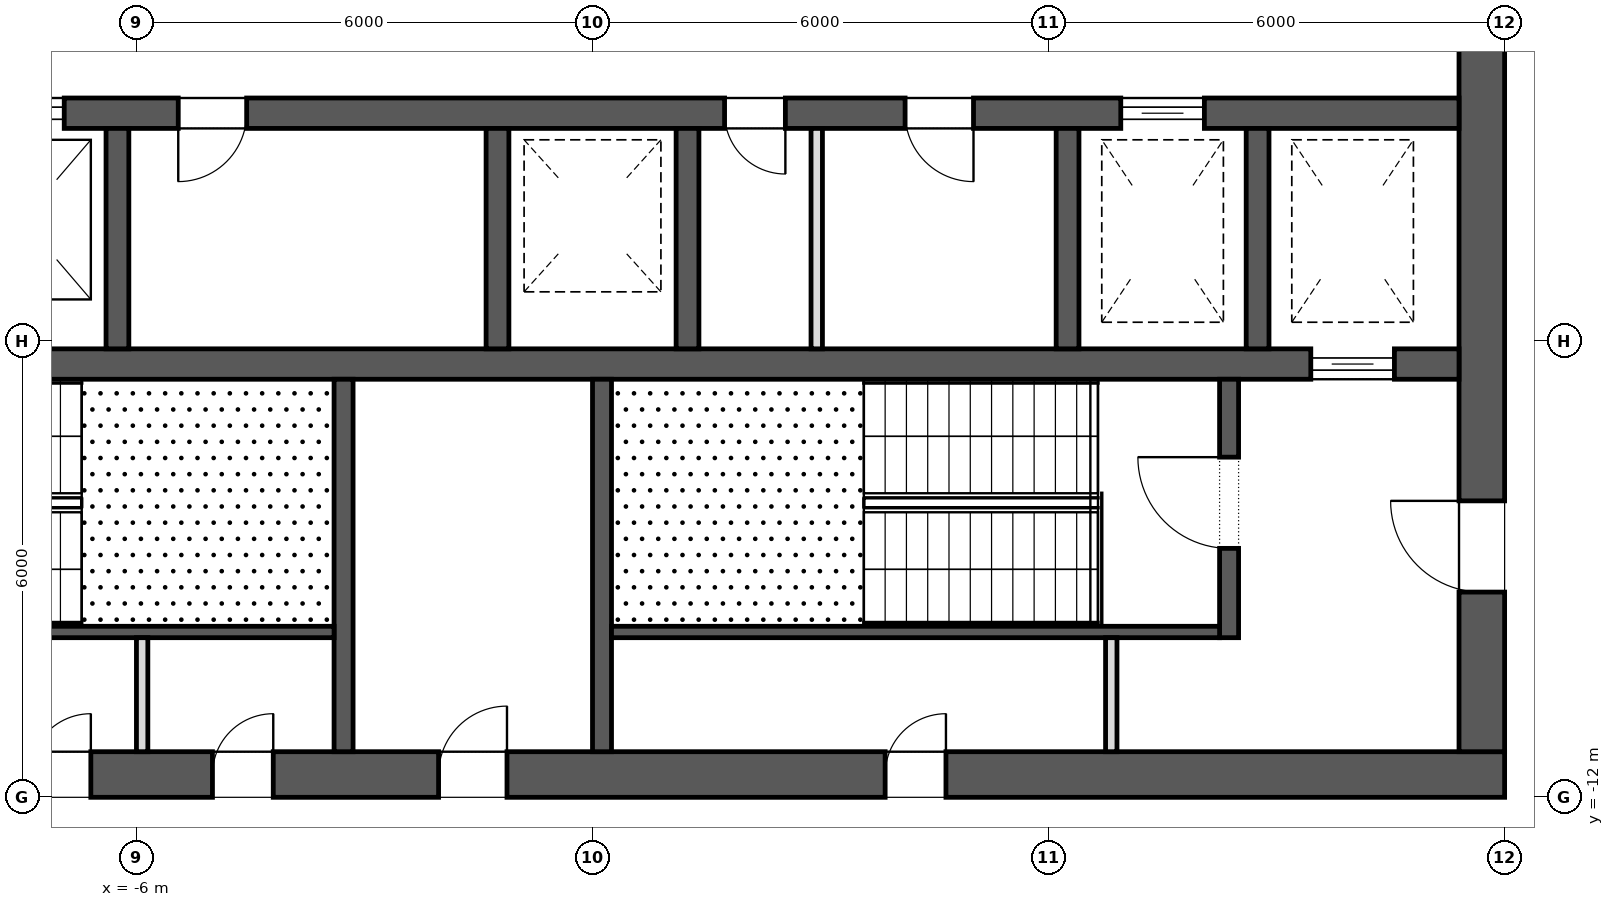
"""IFC4 building model, lengths in metres.
Left out: names, types, materials, properties, quantities, classifications, styles, units other than length and angle.
Written with IfcOpenShell. Run it as: python <this file> out.ifc"""

import sys

from ifc_helpers import new_model, si_unit, direction, frame, frame_2d, origin, place, context, subcontext, project, spatial, rectangle, extrude, element, fill, save


model = new_model("IFC4")
c1 = context("Model", 3, precision=1e-05, world=origin(), true_north=direction((0.0, 1.0)))
c2 = subcontext(c1, "Body", "Model", "MODEL_VIEW")
j1 = project(units=[si_unit("LENGTHUNIT", "METRE"), si_unit("PLANEANGLEUNIT", "RADIAN")], contexts=[c1])
p1 = place(None, origin())
s1 = spatial("IfcSite", under=j1, at=p1, CompositionType="ELEMENT")
p2 = place(p1, origin())
s2 = spatial("IfcBuilding", under=s1, at=p2, CompositionType="ELEMENT")
p3 = place(p2, frame((0.0, 0.0, 292.3)))
s3 = spatial("IfcBuildingStorey", under=s2, at=p3, CompositionType="ELEMENT", Elevation=292.3)
p4 = place(p3, frame((-12.0, -11.7, 0.0), z_axis=(0.0, 0.0, 1.0), x_axis=(1.0, 0.0, 0.0)))
e1 = element("IfcWall", 1, at=p4, inside=s3, PredefinedType="SHEAR", context=c2, shape_type="SweptSolid", body=[
    extrude(rectangle(XDim=24.0, YDim=0.6, at=frame_2d((12.0, 0.0))), origin(), (0.0, 0.0, 1.0), 4.0),
])
p5 = place(p4, frame((9.975, 0.0, 0.0)))
e2 = element("IfcOpeningElement", 2, at=p5, cuts=e1, PredefinedType="OPENING", context=c2, shape_type="SweptSolid", body=[
    extrude(rectangle(XDim=0.9, YDim=2.1, at=frame_2d((0.45, 1.05))), frame((0.0, 0.312, 0.0), z_axis=(0.0, -1.0, 0.0), x_axis=(1.0, 0.0, 0.0)), (0.0, 0.0, 1.0), 0.624),
])
p6 = place(p4, frame((4.6, 0.0, 0.0)))
e3 = element("IfcOpeningElement", 3, at=p6, cuts=e1, PredefinedType="OPENING", context=c2, shape_type="SweptSolid", body=[
    extrude(rectangle(XDim=0.8, YDim=2.1, at=frame_2d((0.4, 1.05))), frame((0.0, 0.312, 0.0), z_axis=(0.0, -1.0, 0.0), x_axis=(1.0, 0.0, 0.0)), (0.0, 0.0, 1.0), 0.624),
])
p7 = place(p4, frame((7.0, 0.0, 0.0)))
e4 = element("IfcOpeningElement", 4, at=p7, cuts=e1, PredefinedType="OPENING", context=c2, shape_type="SweptSolid", body=[
    extrude(rectangle(XDim=0.8, YDim=2.1, at=frame_2d((0.4, 1.05))), frame((0.0, 0.312, 0.0), z_axis=(0.0, -1.0, 0.0), x_axis=(1.0, 0.0, 0.0)), (0.0, 0.0, 1.0), 0.624),
])
p8 = place(p4, frame((15.85, 0.0, 0.0)))
e5 = element("IfcOpeningElement", 5, at=p8, cuts=e1, PredefinedType="OPENING", context=c2, shape_type="SweptSolid", body=[
    extrude(rectangle(XDim=0.8, YDim=2.1, at=frame_2d((0.4, 1.05))), frame((0.0, 0.312, 0.0), z_axis=(0.0, -1.0, 0.0), x_axis=(1.0, 0.0, 0.0)), (0.0, 0.0, 1.0), 0.624),
])
p9 = place(p3, frame((11.7, -11.4, 0.0), z_axis=(0.0, 0.0, 1.0), x_axis=(0.0, 1.0, 0.0)))
e6 = element("IfcWall", 6, at=p9, inside=s3, PredefinedType="SHEAR", context=c2, shape_type="SweptSolid", body=[
    extrude(rectangle(XDim=22.8, YDim=0.6, at=frame_2d((11.4, 0.0))), origin(), (0.0, 0.0, 1.0), 4.0),
])
p10 = place(p9, frame((10.2, 0.0, 0.0)))
e7 = element("IfcOpeningElement", 7, at=p10, cuts=e6, PredefinedType="OPENING", context=c2, shape_type="SweptSolid", body=[
    extrude(rectangle(XDim=2.4, YDim=2.1, at=frame_2d((1.2, 1.05))), frame((0.0, 0.312, 0.0), z_axis=(0.0, -1.0, 0.0), x_axis=(1.0, 0.0, 0.0)), (0.0, 0.0, 1.0), 0.624),
])
p11 = place(p9, frame((19.5, 0.0, 0.0)))
e8 = element("IfcOpeningElement", 8, at=p11, cuts=e6, PredefinedType="OPENING", context=c2, shape_type="SweptSolid", body=[
    extrude(rectangle(XDim=1.2, YDim=2.1, at=frame_2d((0.6, 1.05))), frame((0.0, 0.312, 0.0), z_axis=(0.0, -1.0, 0.0), x_axis=(1.0, 0.0, 0.0)), (0.0, 0.0, 1.0), 0.624),
])
p12 = place(p9, frame((2.1, 0.0, 0.0)))
e9 = element("IfcOpeningElement", 9, at=p12, cuts=e6, PredefinedType="OPENING", context=c2, shape_type="SweptSolid", body=[
    extrude(rectangle(XDim=1.2, YDim=2.1, at=frame_2d((0.6, 1.05))), frame((0.0, 0.312, 0.0), z_axis=(0.0, -1.0, 0.0), x_axis=(1.0, 0.0, 0.0)), (0.0, 0.0, 1.0), 0.624),
])
p13 = place(p3, frame((-11.4, -3.0, 0.0), z_axis=(0.0, 0.0, 1.0), x_axis=(1.0, 0.0, 0.0)))
e10 = element("IfcWall", 10, at=p13, inside=s3, PredefinedType="SHEAR", context=c2, shape_type="SweptSolid", body=[
    extrude(rectangle(XDim=22.8, YDim=0.4, at=frame_2d((11.4, 0.0))), origin(), (0.0, 0.0, 1.0), 4.0),
])
p14 = place(p13, frame((0.85, 0.0, 0.0)))
e11 = element("IfcOpeningElement", 11, at=p14, cuts=e10, PredefinedType="OPENING", context=c2, shape_type="SweptSolid", body=[
    extrude(rectangle(XDim=1.1, YDim=2.1, at=frame_2d((0.55, 1.05))), frame((0.0, 0.212, 0.0), z_axis=(0.0, -1.0, 0.0), x_axis=(1.0, 0.0, 0.0)), (0.0, 0.0, 1.0), 0.424),
])
p15 = place(p13, frame((3.35, 0.0, 0.0)))
e12 = element("IfcOpeningElement", 12, at=p15, cuts=e10, PredefinedType="OPENING", context=c2, shape_type="SweptSolid", body=[
    extrude(rectangle(XDim=1.1, YDim=2.1, at=frame_2d((0.55, 1.05))), frame((0.0, 0.212, 0.0), z_axis=(0.0, -1.0, 0.0), x_axis=(1.0, 0.0, 0.0)), (0.0, 0.0, 1.0), 0.424),
])
p16 = place(p13, frame((18.35, 0.0, 0.0)))
e13 = element("IfcOpeningElement", 13, at=p16, cuts=e10, PredefinedType="OPENING", context=c2, shape_type="SweptSolid", body=[
    extrude(rectangle(XDim=1.1, YDim=2.1, at=frame_2d((0.55, 1.05))), frame((0.0, 0.212, 0.0), z_axis=(0.0, -1.0, 0.0), x_axis=(1.0, 0.0, 0.0)), (0.0, 0.0, 1.0), 0.424),
])
p17 = place(p13, frame((13.137, 0.0, 0.0)))
e14 = element("IfcOpeningElement", 14, at=p17, cuts=e10, PredefinedType="OPENING", context=c2, shape_type="SweptSolid", body=[
    extrude(rectangle(XDim=0.8, YDim=2.1, at=frame_2d((0.4, 1.05))), frame((0.0, 0.212, 0.0), z_axis=(0.0, -1.0, 0.0), x_axis=(1.0, 0.0, 0.0)), (0.0, 0.0, 1.0), 0.424),
])
p18 = place(p13, frame((15.512, 0.0, 0.0)))
e15 = element("IfcOpeningElement", 15, at=p18, cuts=e10, PredefinedType="OPENING", context=c2, shape_type="SweptSolid", body=[
    extrude(rectangle(XDim=0.9, YDim=2.1, at=frame_2d((0.45, 1.05))), frame((0.0, 0.212, 0.0), z_axis=(0.0, -1.0, 0.0), x_axis=(1.0, 0.0, 0.0)), (0.0, 0.0, 1.0), 0.424),
])
p19 = place(p13, frame((5.95, 0.0, 0.0)))
e16 = element("IfcOpeningElement", 16, at=p19, cuts=e10, PredefinedType="OPENING", context=c2, shape_type="SweptSolid", body=[
    extrude(rectangle(XDim=0.9, YDim=2.1, at=frame_2d((0.45, 1.05))), frame((0.0, 0.212, 0.0), z_axis=(0.0, -1.0, 0.0), x_axis=(1.0, 0.0, 0.0)), (0.0, 0.0, 1.0), 0.424),
])
p20 = place(p3, frame((-11.4, -6.3, 0.0), z_axis=(0.0, 0.0, 1.0), x_axis=(1.0, 0.0, 0.0)))
e17 = element("IfcWall", 17, at=p20, inside=s3, PredefinedType="SHEAR", context=c2, shape_type="SweptSolid", body=[
    extrude(rectangle(XDim=22.8, YDim=0.4, at=frame_2d((11.4, 0.0))), origin(), (0.0, 0.0, 1.0), 4.0),
])
p21 = place(p20, frame((20.85, 0.0, 0.0)))
e18 = element("IfcOpeningElement", 18, at=p21, cuts=e17, PredefinedType="OPENING", context=c2, shape_type="SweptSolid", body=[
    extrude(rectangle(XDim=1.1, YDim=2.1, at=frame_2d((0.55, 1.05))), frame((0.0, 0.212, 0.0), z_axis=(0.0, -1.0, 0.0), x_axis=(1.0, 0.0, 0.0)), (0.0, 0.0, 1.0), 0.424),
])
for number, where, z_axis, x_axis in (
    (19, (-6.25, -6.1, 0.0), (0.0, 0.0, 1.0), (0.0, 1.0, 0.0)),
    (20, (-1.25, -6.1, 0.0), (0.0, 0.0, 1.0), (0.0, 1.0, 0.0)),
    (21, (1.25, -6.1, 0.0), (0.0, 0.0, 1.0), (0.0, 1.0, 0.0)),
    (22, (6.25, -6.1, 0.0), (0.0, 0.0, 1.0), (0.0, 1.0, 0.0)),
    (23, (8.75, -6.1, 0.0), (0.0, 0.0, 1.0), (0.0, 1.0, 0.0)),
):
    element("IfcWall", number, at=place(p3, frame(where, z_axis=z_axis, x_axis=x_axis)), inside=s3, PredefinedType="SHEAR", context=c2, shape_type="SweptSolid", body=[
        extrude(rectangle(XDim=2.9, YDim=0.3, at=frame_2d((1.45, 0.0))), origin(), (0.0, 0.0, 1.0), 4.0),
    ])
for number, where, z_axis, x_axis in (
    (24, (-3.275, -11.4, 0.0), (0.0, 0.0, 1.0), (0.0, 1.0, 0.0)),
    (25, (0.125, -11.4, 0.0), (0.0, 0.0, 1.0), (0.0, 1.0, 0.0)),
):
    element("IfcWall", number, at=place(p3, frame(where, z_axis=z_axis, x_axis=x_axis)), inside=s3, PredefinedType="SHEAR", context=c2, shape_type="SweptSolid", body=[
        extrude(rectangle(XDim=4.9, YDim=0.25, at=frame_2d((2.45, 0.0))), origin(), (0.0, 0.0, 1.0), 3.7),
    ])
p22 = place(p3, frame((8.375, -9.9, 0.0), z_axis=(0.0, 0.0, 1.0), x_axis=(0.0, 1.0, 0.0)))
e26 = element("IfcWall", 26, at=p22, inside=s3, PredefinedType="SHEAR", context=c2, shape_type="SweptSolid", body=[
    extrude(rectangle(XDim=3.4, YDim=0.25, at=frame_2d((1.7, 0.0))), origin(), (0.0, 0.0, 1.0), 3.7),
])
p23 = place(p22, frame((1.175, 0.0, 0.0)))
e27 = element("IfcOpeningElement", 27, at=p23, cuts=e26, PredefinedType="OPENING", context=c2, shape_type="SweptSolid", body=[
    extrude(rectangle(XDim=1.2, YDim=2.1, at=frame_2d((0.6, 1.05))), frame((0.0, 0.137, 0.0), z_axis=(0.0, -1.0, 0.0), x_axis=(1.0, 0.0, 0.0)), (0.0, 0.0, 1.0), 0.274),
])
for number, where, z_axis, x_axis in (
    (28, (-11.4, -9.825, 0.0), (0.0, 0.0, 1.0), (1.0, 0.0, 0.0)),
    (29, (0.25, -9.825, 0.0), (0.0, 0.0, 1.0), (1.0, 0.0, 0.0)),
):
    element("IfcWall", number, at=place(p3, frame(where, z_axis=z_axis, x_axis=x_axis)), inside=s3, PredefinedType="SHEAR", context=c2, shape_type="SweptSolid", body=[
        extrude(rectangle(XDim=8.0, YDim=0.15, at=frame_2d((4.0, 0.0))), origin(), (0.0, 0.0, 1.0), 3.7),
    ])
for number, where, z_axis, x_axis in (
    (30, (-5.925, -11.4, 0.0), (0.0, 0.0, 1.0), (0.0, 1.0, 0.0)),
    (31, (6.825, -11.4, 0.0), (0.0, 0.0, 1.0), (0.0, 1.0, 0.0)),
):
    element("IfcWall", number, at=place(p3, frame(where, z_axis=z_axis, x_axis=x_axis)), inside=s3, PredefinedType="PARTITIONING", context=c2, shape_type="SweptSolid", body=[
        extrude(rectangle(XDim=1.5, YDim=0.15, at=frame_2d((0.75, 0.0))), origin(), (0.0, 0.0, 1.0), 3.7),
    ])
p24 = place(p3, frame((2.95, -6.1, 0.0), z_axis=(0.0, 0.0, 1.0), x_axis=(0.0, 1.0, 0.0)))
e32 = element("IfcWall", 32, at=p24, inside=s3, PredefinedType="PARTITIONING", context=c2, shape_type="SweptSolid", body=[
    extrude(rectangle(XDim=2.9, YDim=0.15, at=frame_2d((1.45, 0.0))), origin(), (0.0, 0.0, 1.0), 3.7),
])
p25 = place(p21, origin())
e33 = element("IfcDoor", 33, at=p25, inside=s3, OperationType="SLIDING_TO_LEFT", PredefinedType="DOOR", context=c2, shape_type="SweptSolid", body=[
    extrude(rectangle(XDim=1.1, YDim=2.1, at=frame_2d((0.55, 1.05))), frame((0.0, 0.025, 0.0), z_axis=(0.0, -1.0, 0.0), x_axis=(1.0, 0.0, 0.0)), (0.0, 0.0, 1.0), 0.05),
])
fill(e18, e33)
p26 = place(p15, origin())
e34 = element("IfcDoor", 34, at=p26, inside=s3, OperationType="SLIDING_TO_LEFT", PredefinedType="DOOR", context=c2, shape_type="SweptSolid", body=[
    extrude(rectangle(XDim=1.1, YDim=2.1, at=frame_2d((0.55, 1.05))), frame((0.0, 0.025, 0.0), z_axis=(0.0, -1.0, 0.0), x_axis=(1.0, 0.0, 0.0)), (0.0, 0.0, 1.0), 0.05),
])
fill(e12, e34)
p27 = place(p16, origin())
e35 = element("IfcDoor", 35, at=p27, inside=s3, OperationType="SLIDING_TO_LEFT", PredefinedType="DOOR", context=c2, shape_type="SweptSolid", body=[
    extrude(rectangle(XDim=1.1, YDim=2.1, at=frame_2d((0.55, 1.05))), frame((0.0, 0.025, 0.0), z_axis=(0.0, -1.0, 0.0), x_axis=(1.0, 0.0, 0.0)), (0.0, 0.0, 1.0), 0.05),
])
fill(e13, e35)
p28 = place(p23, origin())
e36 = element("IfcDoor", 36, at=p28, inside=s3, OperationType="SINGLE_SWING_LEFT", PredefinedType="DOOR", context=c2, shape_type="SweptSolid", body=[
    extrude(rectangle(XDim=1.2, YDim=2.1, at=frame_2d((0.6, 1.05))), frame((0.0, 0.025, 0.0), z_axis=(0.0, -1.0, 0.0), x_axis=(1.0, 0.0, 0.0)), (0.0, 0.0, 1.0), 0.05),
])
fill(e27, e36)
p29 = place(p12, origin())
e37 = element("IfcDoor", 37, at=p29, inside=s3, OperationType="SINGLE_SWING_LEFT", PredefinedType="DOOR", context=c2, shape_type="SweptSolid", body=[
    extrude(rectangle(XDim=1.2, YDim=2.1, at=frame_2d((0.6, 1.05))), frame((0.0, 0.025, 0.0), z_axis=(0.0, -1.0, 0.0), x_axis=(1.0, 0.0, 0.0)), (0.0, 0.0, 1.0), 0.05),
])
fill(e9, e37)
p30 = place(p5, origin())
e38 = element("IfcDoor", 38, at=p30, inside=s3, OperationType="SINGLE_SWING_LEFT", PredefinedType="DOOR", context=c2, shape_type="SweptSolid", body=[
    extrude(rectangle(XDim=0.9, YDim=2.1, at=frame_2d((0.45, 1.05))), frame((0.0, 0.025, 0.0), z_axis=(0.0, -1.0, 0.0), x_axis=(1.0, 0.0, 0.0)), (0.0, 0.0, 1.0), 0.05),
])
fill(e2, e38)
p31 = place(p6, origin())
e39 = element("IfcDoor", 39, at=p31, inside=s3, OperationType="SINGLE_SWING_LEFT", PredefinedType="DOOR", context=c2, shape_type="SweptSolid", body=[
    extrude(rectangle(XDim=0.8, YDim=2.1, at=frame_2d((0.4, 1.05))), frame((0.0, 0.025, 0.0), z_axis=(0.0, -1.0, 0.0), x_axis=(1.0, 0.0, 0.0)), (0.0, 0.0, 1.0), 0.05),
])
fill(e3, e39)
p32 = place(p7, origin())
e40 = element("IfcDoor", 40, at=p32, inside=s3, OperationType="SINGLE_SWING_LEFT", PredefinedType="DOOR", context=c2, shape_type="SweptSolid", body=[
    extrude(rectangle(XDim=0.8, YDim=2.1, at=frame_2d((0.4, 1.05))), frame((0.0, 0.025, 0.0), z_axis=(0.0, -1.0, 0.0), x_axis=(1.0, 0.0, 0.0)), (0.0, 0.0, 1.0), 0.05),
])
fill(e4, e40)
p33 = place(p8, origin())
e41 = element("IfcDoor", 41, at=p33, inside=s3, OperationType="SINGLE_SWING_LEFT", PredefinedType="DOOR", context=c2, shape_type="SweptSolid", body=[
    extrude(rectangle(XDim=0.8, YDim=2.1, at=frame_2d((0.4, 1.05))), frame((0.0, 0.025, 0.0), z_axis=(0.0, -1.0, 0.0), x_axis=(1.0, 0.0, 0.0)), (0.0, 0.0, 1.0), 0.05),
])
fill(e5, e41)
p34 = place(p17, frame((0.8, 0.0, 0.0), z_axis=(0.0, 0.0, 1.0), x_axis=(-1.0, 0.0, 0.0)))
e42 = element("IfcDoor", 42, at=p34, inside=s3, OperationType="SINGLE_SWING_RIGHT", PredefinedType="DOOR", context=c2, shape_type="SweptSolid", body=[
    extrude(rectangle(XDim=0.8, YDim=2.1, at=frame_2d((0.4, 1.05))), frame((0.0, 0.025, 0.0), z_axis=(0.0, -1.0, 0.0), x_axis=(1.0, 0.0, 0.0)), (0.0, 0.0, 1.0), 0.05),
])
fill(e14, e42)
p35 = place(p18, frame((0.9, 0.0, 0.0), z_axis=(0.0, 0.0, 1.0), x_axis=(-1.0, 0.0, 0.0)))
e43 = element("IfcDoor", 43, at=p35, inside=s3, OperationType="SINGLE_SWING_RIGHT", PredefinedType="DOOR", context=c2, shape_type="SweptSolid", body=[
    extrude(rectangle(XDim=0.9, YDim=2.1, at=frame_2d((0.45, 1.05))), frame((0.0, 0.025, 0.0), z_axis=(0.0, -1.0, 0.0), x_axis=(1.0, 0.0, 0.0)), (0.0, 0.0, 1.0), 0.05),
])
fill(e15, e43)
p36 = place(p19, frame((0.9, 0.0, 0.0), z_axis=(0.0, 0.0, 1.0), x_axis=(-1.0, 0.0, 0.0)))
e44 = element("IfcDoor", 44, at=p36, inside=s3, OperationType="SINGLE_SWING_LEFT", PredefinedType="DOOR", context=c2, shape_type="SweptSolid", body=[
    extrude(rectangle(XDim=0.9, YDim=2.1, at=frame_2d((0.45, 1.05))), frame((0.0, 0.025, 0.0), z_axis=(0.0, -1.0, 0.0), x_axis=(1.0, 0.0, 0.0)), (0.0, 0.0, 1.0), 0.05),
])
fill(e16, e44)
save(model, sys.argv[1])
